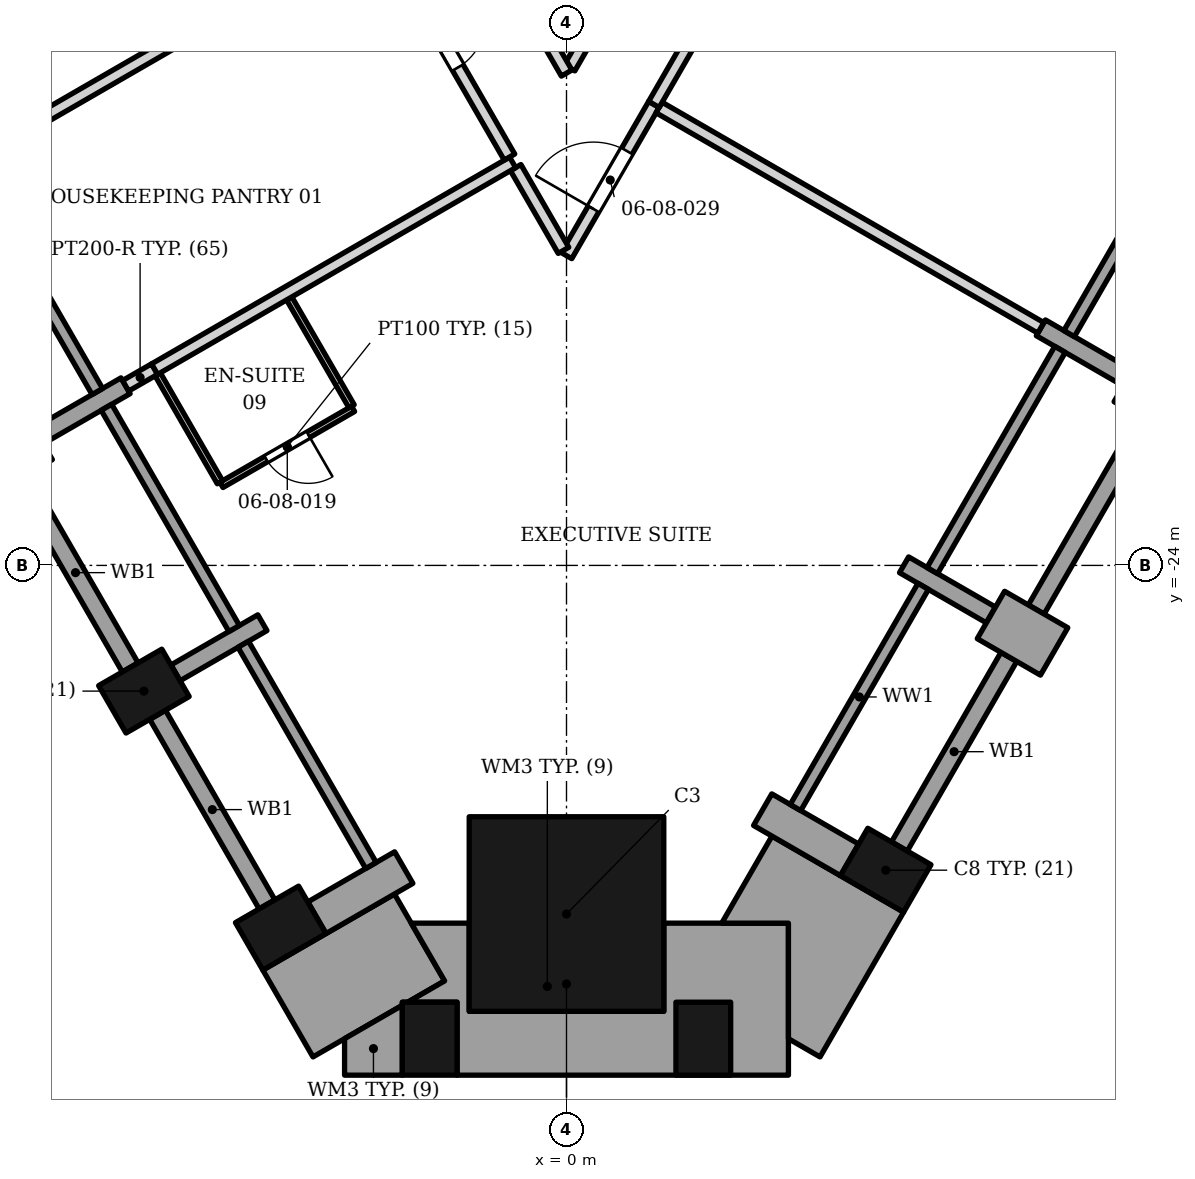
"""IFC4 building model, lengths in metres.
Left out: names, types, materials, properties, quantities, classifications, styles, units other than length and angle.
Written with IfcOpenShell. Run it as: python <this file> out.ifc"""

import sys

from ifc_helpers import new_model, si_unit, direction, frame, frame_2d, origin, origin_2d, place, context, subcontext, project, spatial, polyline, rectangle, outline, extrude, element, fill, save


model = new_model("IFC4")
c1 = context("Model", 3, precision=1e-05, world=origin(), true_north=direction((0.0, 1.0)))
c2 = subcontext(c1, "Body", "Model", "MODEL_VIEW")
j1 = project(units=[si_unit("LENGTHUNIT", "METRE"), si_unit("PLANEANGLEUNIT", "RADIAN")], contexts=[c1])
p1 = place(None, origin())
s1 = spatial("IfcSite", under=j1, at=p1, CompositionType="ELEMENT")
p2 = place(p1, origin())
s2 = spatial("IfcBuilding", under=s1, at=p2, CompositionType="ELEMENT")
p3 = place(p2, frame((0.0, 0.0, 46.0)))
s3 = spatial("IfcBuildingStorey", under=s2, at=p3, CompositionType="ELEMENT", Elevation=46.0)
p4 = place(p3, frame((0.0, -29.733, 0.0), z_axis=(0.0, 0.0, 1.0), x_axis=(0.0, 1.0, 0.0)))
e1 = element("IfcColumn", 1, at=p4, inside=s3, PredefinedType="COLUMN", context=c2, shape_type="SweptSolid", body=[
    extrude(rectangle(XDim=3.2, YDim=3.2, at=origin_2d()), origin(), (0.0, 0.0, 1.0), 3.4),
])
for number, where, z_axis, x_axis in (
    (2, (-6.95, -26.067, 0.0), (0.0, 0.0, 1.0), (0.5, -0.866, 0.0)),
    (3, (-4.7, -29.964, 0.0), (0.0, 0.0, 1.0), (0.5, -0.866, 0.0)),
    (4, (-2.25, -31.783, 0.0), (0.0, 0.0, 1.0), (1.0, 0.0, 0.0)),
    (5, (2.25, -31.783, 0.0), (0.0, 0.0, 1.0), (1.0, 0.0, 0.0)),
    (6, (5.25, -29.012, 0.0), (0.0, 0.0, 1.0), (0.5, 0.866, 0.0)),
    (7, (9.75, -21.218, 0.0), (0.0, 0.0, 1.0), (0.5, 0.866, 0.0)),
):
    element("IfcColumn", number, at=place(p3, frame(where, z_axis=z_axis, x_axis=x_axis)), inside=s3, PredefinedType="COLUMN", context=c2, shape_type="SweptSolid", body=[
        extrude(rectangle(XDim=0.9, YDim=1.2, at=origin_2d()), origin(), (0.0, 0.0, 1.0), 3.4),
    ])
p5 = place(p3, frame((-8.68, -21.87, 0.0), z_axis=(0.0, 0.0, 1.0), x_axis=(-0.866094119867, -0.499880961361, 0.0)))
e8 = element("IfcWall", 8, at=p5, inside=s3, PredefinedType="SOLIDWALL", context=c2, shape_type="SweptSolid", body=[
    extrude(rectangle(XDim=1.2, YDim=0.9, at=frame_2d((0.6, 0.0))), origin(), (0.0, 0.0, 1.0), 2.63),
])
p6 = place(p3, frame((-8.68, -21.87, 0.0), z_axis=(0.0, 0.0, 1.0), x_axis=(0.865976140824, 0.500085316245, 0.0)))
e9 = element("IfcWall", 9, at=p6, inside=s3, PredefinedType="SOLIDWALL", context=c2, shape_type="SweptSolid", body=[
    extrude(rectangle(XDim=1.65, YDim=0.3, at=frame_2d((0.825, 0.0))), origin(), (0.0, 0.0, 1.0), 2.65),
])
p7 = place(p3, frame((-6.43, -25.767, 0.0), z_axis=(0.0, 0.0, 1.0), x_axis=(0.866003217194, 0.500038426333, 0.0)))
e10 = element("IfcWall", 10, at=p7, inside=s3, PredefinedType="SOLIDWALL", context=c2, shape_type="SweptSolid", body=[
    extrude(rectangle(XDim=1.65, YDim=0.3, at=frame_2d((0.825, 0.0))), origin(), (0.0, 0.0, 1.0), 2.374),
])
p8 = place(p3, frame((-2.677, -28.969, 0.0), z_axis=(0.0, 0.0, 1.0), x_axis=(-0.866040211805, -0.499974350878, 0.0)))
e11 = element("IfcWall", 11, at=p8, inside=s3, PredefinedType="SOLIDWALL", context=c2, shape_type="SweptSolid", body=[
    extrude(rectangle(XDim=1.65, YDim=0.6, at=frame_2d((0.825, 0.0))), origin(), (0.0, 0.0, 1.0), 2.63),
])
p9 = place(p3, frame((-9.816, -17.503, 0.0), z_axis=(0.0, 0.0, 1.0), x_axis=(0.500002543286, -0.866023935413, 0.0)))
e12 = element("IfcWall", 12, at=p9, inside=s3, PredefinedType="ELEMENTEDWALL", context=c2, shape_type="SweptSolid", body=[
    extrude(rectangle(XDim=4.2, YDim=0.2, at=frame_2d((2.1, 0.0))), origin(), (0.0, 0.0, 1.0), 2.65),
])
p10 = place(p3, frame((-8.975, -22.56, 0.0), z_axis=(0.0, 0.0, 1.0), x_axis=(0.500012057535, -0.866018442252, 0.0)))
e13 = element("IfcWall", 13, at=p10, inside=s3, PredefinedType="SOLIDWALL", context=c2, shape_type="SweptSolid", body=[
    extrude(rectangle(XDim=3.6, YDim=0.3, at=frame_2d((1.8, 0.0))), origin(), (0.0, 0.0, 1.0), 2.63),
])
p11 = place(p3, frame((-7.566, -21.4, 0.0), z_axis=(0.0, 0.0, 1.0), x_axis=(0.500027713859, -0.866009402589, 0.0)))
e14 = element("IfcWall", 14, at=p11, inside=s3, PredefinedType="ELEMENTEDWALL", context=c2, shape_type="SweptSolid", body=[
    extrude(rectangle(XDim=4.2, YDim=0.2, at=frame_2d((2.1, 0.0))), origin(), (0.0, 0.0, 1.0), 2.65),
])
p12 = place(p3, frame((-4.925, -29.574, 0.0), z_axis=(0.0, 0.0, 1.0), x_axis=(-0.499990559667, 0.866030854095, 0.0)))
e15 = element("IfcWall", 15, at=p12, inside=s3, PredefinedType="SOLIDWALL", context=c2, shape_type="SweptSolid", body=[
    extrude(rectangle(XDim=3.6, YDim=0.3, at=frame_2d((1.8, 0.0))), origin(), (0.0, 0.0, 1.0), 2.63),
])
p13 = place(p3, frame((-5.316, -25.297, 0.0), z_axis=(0.0, 0.0, 1.0), x_axis=(0.500027713859, -0.866009402589, 0.0)))
e16 = element("IfcWall", 16, at=p13, inside=s3, PredefinedType="ELEMENTEDWALL", context=c2, shape_type="SweptSolid", body=[
    extrude(rectangle(XDim=4.2, YDim=0.2, at=frame_2d((2.1, 0.0))), origin(), (0.0, 0.0, 1.0), 2.374),
])
p14 = place(p3, frame((3.226, -28.017, 0.0), z_axis=(0.0, 0.0, 1.0), x_axis=(0.866040211805, -0.499974350878, 0.0)))
e17 = element("IfcWall", 17, at=p14, inside=s3, PredefinedType="SOLIDWALL", context=c2, shape_type="SweptSolid", body=[
    extrude(rectangle(XDim=1.65, YDim=0.6, at=frame_2d((0.825, 0.0))), origin(), (0.0, 0.0, 1.0), 2.65),
])
p15 = place(p3, frame((6.98, -24.815, 0.0), z_axis=(0.0, 0.0, 1.0), x_axis=(0.865955154139, -0.50012165622, 0.0)))
e18 = element("IfcWall", 18, at=p15, inside=s3, PredefinedType="SOLIDWALL", context=c2, shape_type="SweptSolid", body=[
    extrude(rectangle(XDim=1.2, YDim=0.9, at=frame_2d((0.6, 0.0))), origin(), (0.0, 0.0, 1.0), 2.63),
])
p16 = place(p3, frame((6.98, -24.815, 0.0), z_axis=(0.0, 0.0, 1.0), x_axis=(-0.866040211805, 0.499974350878, 0.0)))
e19 = element("IfcWall", 19, at=p16, inside=s3, PredefinedType="SOLIDWALL", context=c2, shape_type="SweptSolid", body=[
    extrude(rectangle(XDim=1.65, YDim=0.3, at=frame_2d((0.825, 0.0))), origin(), (0.0, 0.0, 1.0), 2.65),
])
p17 = place(p3, frame((7.802, -20.093, 0.0), z_axis=(0.0, 0.0, 1.0), x_axis=(0.865976140824, -0.500085316245, 0.0)))
e20 = element("IfcWall", 20, at=p17, inside=s3, PredefinedType="SOLIDWALL", context=c2, shape_type="SweptSolid", body=[
    extrude(rectangle(XDim=1.65, YDim=0.3, at=frame_2d((0.825, 0.0))), origin(), (0.0, 0.0, 1.0), 2.65),
])
p18 = place(p3, frame((5.475, -28.622, 0.0), z_axis=(0.0, 0.0, 1.0), x_axis=(0.499961193289, 0.866047807691, 0.0)))
e21 = element("IfcWall", 21, at=p18, inside=s3, PredefinedType="SOLIDWALL", context=c2, shape_type="SweptSolid", body=[
    extrude(rectangle(XDim=3.6, YDim=0.3, at=frame_2d((1.8, 0.0))), origin(), (0.0, 0.0, 1.0), 2.374),
])
p19 = place(p3, frame((3.766, -27.982, 0.0), z_axis=(0.0, 0.0, 1.0), x_axis=(0.500027713859, 0.866009402589, 0.0)))
e22 = element("IfcWall", 22, at=p19, inside=s3, PredefinedType="ELEMENTEDWALL", context=c2, shape_type="SweptSolid", body=[
    extrude(rectangle(XDim=4.2, YDim=0.2, at=frame_2d((2.1, 0.0))), origin(), (0.0, 0.0, 1.0), 2.374),
])
p20 = place(p3, frame((7.725, -24.725, 0.0), z_axis=(0.0, 0.0, 1.0), x_axis=(0.499961193289, 0.866047807691, 0.0)))
e23 = element("IfcWall", 23, at=p20, inside=s3, PredefinedType="SOLIDWALL", context=c2, shape_type="SweptSolid", body=[
    extrude(rectangle(XDim=3.6, YDim=0.3, at=frame_2d((1.8, 0.0))), origin(), (0.0, 0.0, 1.0), 2.63),
])
p21 = place(p3, frame((6.016, -24.085, 0.0), z_axis=(0.0, 0.0, 1.0), x_axis=(0.500027713859, 0.866009402589, 0.0)))
e24 = element("IfcWall", 24, at=p21, inside=s3, PredefinedType="ELEMENTEDWALL", context=c2, shape_type="SweptSolid", body=[
    extrude(rectangle(XDim=4.2, YDim=0.2, at=frame_2d((2.1, 0.0))), origin(), (0.0, 0.0, 1.0), 2.65),
])
p22 = place(p3, frame((8.266, -20.188, 0.0), z_axis=(0.0, 0.0, 1.0), x_axis=(0.500002543286, 0.866023935413, 0.0)))
e25 = element("IfcWall", 25, at=p22, inside=s3, PredefinedType="ELEMENTEDWALL", context=c2, shape_type="SweptSolid", body=[
    extrude(rectangle(XDim=4.2, YDim=0.2, at=frame_2d((2.1, 0.0))), origin(), (0.0, 0.0, 1.0), 2.65),
])
p23 = place(p3, origin())
e26 = element("IfcWall", 26, at=p23, inside=s3, PredefinedType="SOLIDWALL", context=c2, shape_type="SweptSolid", body=[
    extrude(outline(polyline([(-2.005, -30.833), (-2.83, -29.404), (-4.995, -30.654), (-4.17, -32.083), (-2.7, -31.235), (-2.7, -31.183), (-2.611, -31.183), (-2.005, -30.833)])), origin(), (0.0, 0.0, 1.0), 2.63),
])
p24 = place(p3, origin())
e27 = element("IfcWall", 27, at=p24, inside=s3, PredefinedType="SOLIDWALL", context=c2, shape_type="SweptSolid", body=[
    extrude(outline(polyline([(-3.65, -31.783), (-3.65, -32.383), (-2.7, -32.383), (-2.7, -31.235), (-3.65, -31.783)])), origin(), (0.0, 0.0, 1.0), 2.63),
])
p25 = place(p3, origin())
e28 = element("IfcWall", 28, at=p25, inside=s3, PredefinedType="SOLIDWALL", context=c2, shape_type="SweptSolid", body=[
    extrude(outline(polyline([(-1.8, -31.183), (-1.8, -32.383), (3.65, -32.383), (3.65, -29.883), (1.6, -29.883), (1.6, -31.333), (-1.6, -31.333), (-1.6, -29.883), (-2.553, -29.883), (-2.005, -30.833), (-2.611, -31.183), (-1.8, -31.183)])), origin(), (0.0, 0.0, 1.0), 2.63),
])
p26 = place(p3, origin())
e29 = element("IfcWall", 29, at=p26, inside=s3, PredefinedType="SOLIDWALL", context=c2, shape_type="SweptSolid", body=[
    extrude(outline(polyline([(4.505, -29.102), (3.38, -28.452), (2.553, -29.883), (3.65, -29.883), (3.65, -31.783), (4.17, -32.083), (5.544, -29.702), (4.505, -29.102), (4.505, -29.102)])), origin(), (0.0, 0.0, 1.0), 2.63),
])
p27 = place(p3, frame((-5.675, -22.676, 0.0), z_axis=(0.0, 0.0, 1.0), x_axis=(0.866022959057, 0.500004234368, 0.0)))
e30 = element("IfcWall", 30, at=p27, inside=s3, PredefinedType="PARTITIONING", context=c2, shape_type="SweptSolid", body=[
    extrude(rectangle(XDim=2.5, YDim=0.1, at=frame_2d((1.25, 0.0))), origin(), (0.0, 0.0, 1.0), 2.552),
])
p28 = place(p27, frame((0.85, 0.0, 0.0)))
e31 = element("IfcOpeningElement", 31, at=p28, cuts=e30, PredefinedType="OPENING", context=c2, shape_type="SweptSolid", body=[
    extrude(rectangle(XDim=0.8, YDim=2.1, at=frame_2d((0.4, 1.05))), frame((0.0, 0.06, 0.0), z_axis=(0.0, -1.0, 0.0), x_axis=(1.0, 0.0, 0.0)), (0.0, 0.0, 1.0), 0.12),
])
p29 = place(p3, frame((-4.561, -19.608, 0.0), z_axis=(0.0, 0.0, 1.0), x_axis=(0.500646589026, -0.865651773461, 0.0)))
e32 = element("IfcWall", 32, at=p29, inside=s3, PredefinedType="PARTITIONING", context=c2, shape_type="SweptSolid", body=[
    extrude(rectangle(XDim=2.05, YDim=0.1, at=frame_2d((1.025, 0.0))), origin(), (0.0, 0.0, 1.0), 2.552),
])
p30 = place(p3, frame((-7.251, -21.046, 0.0), z_axis=(0.0, 0.0, 1.0), x_axis=(0.86747675874, 0.497477711105, 0.0)))
e33 = element("IfcWall", 33, at=p30, inside=s3, PredefinedType="PARTITIONING", context=c2, shape_type="SweptSolid", body=[
    extrude(rectangle(XDim=0.55, YDim=0.2, at=frame_2d((0.275, 0.0))), origin(), (0.0, 0.0, 1.0), 3.23),
])
p31 = place(p3, frame((-6.723, -20.856, 0.0), z_axis=(0.0, 0.0, 1.0), x_axis=(0.499354689006, -0.866397653833, 0.0)))
e34 = element("IfcWall", 34, at=p31, inside=s3, PredefinedType="PARTITIONING", context=c2, shape_type="SweptSolid", body=[
    extrude(rectangle(XDim=2.05, YDim=0.1, at=frame_2d((1.025, 0.0))), origin(), (0.0, 0.0, 1.0), 3.23),
])
p32 = place(p3, frame((0.0, -18.906, 0.0), z_axis=(0.0, 0.0, 1.0), x_axis=(0.50046312627, 0.865757852545, 0.0)))
e35 = element("IfcWall", 35, at=p32, inside=s3, PredefinedType="PARTITIONING", context=c2, shape_type="SweptSolid", body=[
    extrude(rectangle(XDim=2.872, YDim=0.2, at=frame_2d((1.436, 0.0))), origin(), (0.0, 0.0, 1.0), 2.628),
])
p33 = place(p32, frame((0.886, 0.0, 0.0)))
e36 = element("IfcOpeningElement", 36, at=p33, cuts=e35, PredefinedType="OPENING", context=c2, shape_type="SweptSolid", body=[
    extrude(rectangle(XDim=1.1, YDim=2.1, at=frame_2d((0.55, 1.05))), frame((0.0, 0.11, 0.0), z_axis=(0.0, -1.0, 0.0), x_axis=(1.0, 0.0, 0.0)), (0.0, 0.0, 1.0), 0.22),
])
p34 = place(p3, frame((-0.836, -17.458, 0.0), z_axis=(0.0, 0.0, 1.0), x_axis=(0.50013013712, -0.865950256045, 0.0)))
e37 = element("IfcWall", 37, at=p34, inside=s3, PredefinedType="PARTITIONING", context=c2, shape_type="SweptSolid", body=[
    extrude(rectangle(XDim=1.572, YDim=0.2, at=frame_2d((0.786, 0.0))), origin(), (0.0, 0.0, 1.0), 2.628),
])
p35 = place(p3, frame((-6.774, -20.772, 0.0), z_axis=(0.0, 0.0, 1.0), x_axis=(0.866036107898, 0.499981459473, 0.0)))
e38 = element("IfcWall", 38, at=p35, inside=s3, PredefinedType="PARTITIONING", context=c2, shape_type="SweptSolid", body=[
    extrude(rectangle(XDim=6.8, YDim=0.2, at=frame_2d((3.4, 0.0))), origin(), (0.0, 0.0, 1.0), 2.552),
])
p36 = place(p3, frame((-3.137, -13.476, 0.0), z_axis=(0.0, 0.0, 1.0), x_axis=(0.499989943423, -0.866031209874, 0.0)))
e39 = element("IfcWall", 39, at=p36, inside=s3, PredefinedType="PARTITIONING", context=c2, shape_type="SweptSolid", body=[
    extrude(rectangle(XDim=4.398, YDim=0.2, at=frame_2d((2.199, 0.0))), origin(), (0.0, 0.0, 1.0), 3.23),
])
p37 = place(p36, frame((1.798, 0.0, 0.0)))
e40 = element("IfcOpeningElement", 40, at=p37, cuts=e39, PredefinedType="OPENING", context=c2, shape_type="SweptSolid", body=[
    extrude(rectangle(XDim=0.9, YDim=2.1, at=frame_2d((0.45, 1.05))), frame((0.0, 0.11, 0.0), z_axis=(0.0, -1.0, 0.0), x_axis=(1.0, 0.0, 0.0)), (0.0, 0.0, 1.0), 0.22),
])
p38 = place(p3, frame((1.522, -16.469, 0.0), z_axis=(0.0, 0.0, 1.0), x_axis=(0.866125590059, -0.499826432119, 0.0)))
e41 = element("IfcWall", 41, at=p38, inside=s3, PredefinedType="PARTITIONING", context=c2, shape_type="SweptSolid", body=[
    extrude(rectangle(XDim=7.25, YDim=0.2, at=frame_2d((3.625, 0.0))), origin(), (0.0, 0.0, 1.0), 2.552),
])
p39 = place(p3, frame((0.05, -15.818, 0.0), z_axis=(0.0, 0.0, 1.0), x_axis=(0.499521489101, 0.866301495974, 0.0)))
e42 = element("IfcWall", 42, at=p39, inside=s3, PredefinedType="PARTITIONING", context=c2, shape_type="SweptSolid", body=[
    extrude(rectangle(XDim=3.401, YDim=0.2, at=frame_2d((1.7, 0.0))), origin(), (0.0, 0.0, 1.0), 2.628),
])
p40 = place(p39, frame((1.2, 0.0, 0.0)))
e43 = element("IfcOpeningElement", 43, at=p40, cuts=e42, PredefinedType="OPENING", context=c2, shape_type="SweptSolid", body=[
    extrude(rectangle(XDim=0.9, YDim=2.1, at=frame_2d((0.45, 1.05))), frame((0.0, 0.11, 0.0), z_axis=(0.0, -1.0, 0.0), x_axis=(1.0, 0.0, 0.0)), (0.0, 0.0, 1.0), 0.22),
])
p41 = place(p3, frame((-9.501, -17.148, 0.0), z_axis=(0.0, 0.0, 1.0), x_axis=(0.866032838626, 0.499987122256, 0.0)))
e44 = element("IfcWall", 44, at=p41, inside=s3, PredefinedType="PARTITIONING", context=c2, shape_type="SweptSolid", body=[
    extrude(rectangle(XDim=4.551, YDim=0.2, at=frame_2d((2.276, 0.0))), origin(), (0.0, 0.0, 1.0), 2.782),
])
p42 = place(p3, frame((-6.783, -4.156, 0.0), z_axis=(0.0, 0.0, 1.0), x_axis=(0.500162761554, -0.865931412962, 0.0)))
e45 = element("IfcWall", 45, at=p42, inside=s3, PredefinedType="PARTITIONING", context=c2, shape_type="SweptSolid", body=[
    extrude(rectangle(XDim=13.566, YDim=0.2, at=frame_2d((6.783, 0.0))), origin(), (0.0, 0.0, 1.0), 2.302),
])
p43 = place(p42, frame((4.642, 0.0, 0.0)))
e46 = element("IfcOpeningElement", 46, at=p43, cuts=e45, PredefinedType="OPENING", context=c2, shape_type="SweptSolid", body=[
    extrude(rectangle(XDim=0.9, YDim=2.1, at=frame_2d((0.45, 1.05))), frame((0.0, 0.11, 0.0), z_axis=(0.0, -1.0, 0.0), x_axis=(1.0, 0.0, 0.0)), (0.0, 0.0, 1.0), 0.22),
])
p44 = place(p3, frame((1.438, -16.419, 0.0), z_axis=(0.0, 0.0, 1.0), x_axis=(0.499996012009, 0.86602770624, 0.0)))
e47 = element("IfcWall", 47, at=p44, inside=s3, PredefinedType="PARTITIONING", context=c2, shape_type="SweptSolid", body=[
    extrude(rectangle(XDim=18.0, YDim=0.2, at=frame_2d((9.0, 0.0))), origin(), (0.0, 0.0, 1.0), 2.302),
])
p45 = place(p44, frame((4.0, 0.0, 0.0)))
e48 = element("IfcOpeningElement", 48, at=p45, cuts=e47, PredefinedType="OPENING", context=c2, shape_type="SweptSolid", body=[
    extrude(rectangle(XDim=1.0, YDim=2.1, at=frame_2d((0.5, 1.05))), frame((0.0, 0.11, 0.0), z_axis=(0.0, -1.0, 0.0), x_axis=(1.0, 0.0, 0.0)), (0.0, 0.0, 1.0), 0.22),
])
p46 = place(p44, frame((9.8, 0.0, 0.0)))
e49 = element("IfcOpeningElement", 49, at=p46, cuts=e47, PredefinedType="OPENING", context=c2, shape_type="SweptSolid", body=[
    extrude(rectangle(XDim=1.1, YDim=2.1, at=frame_2d((0.55, 1.05))), frame((0.0, 0.11, 0.0), z_axis=(0.0, -1.0, 0.0), x_axis=(1.0, 0.0, 0.0)), (0.0, 0.0, 1.0), 0.22),
])
p47 = place(p37, origin())
e50 = element("IfcDoor", 50, at=p47, inside=s3, OperationType="SINGLE_SWING_LEFT", PredefinedType="DOOR", context=c2, shape_type="SweptSolid", body=[
    extrude(rectangle(XDim=0.9, YDim=2.1, at=frame_2d((0.45, 1.05))), frame((0.0, 0.025, 0.0), z_axis=(0.0, -1.0, 0.0), x_axis=(1.0, 0.0, 0.0)), (0.0, 0.0, 1.0), 0.05),
])
fill(e40, e50)
p48 = place(p28, origin())
e51 = element("IfcDoor", 51, at=p48, inside=s3, OperationType="SINGLE_SWING_RIGHT", PredefinedType="DOOR", context=c2, shape_type="SweptSolid", body=[
    extrude(rectangle(XDim=0.8, YDim=2.1, at=frame_2d((0.4, 1.05))), frame((0.0, 0.025, 0.0), z_axis=(0.0, -1.0, 0.0), x_axis=(1.0, 0.0, 0.0)), (0.0, 0.0, 1.0), 0.05),
])
fill(e31, e51)
p49 = place(p33, origin())
e52 = element("IfcDoor", 52, at=p49, inside=s3, OperationType="SINGLE_SWING_LEFT", PredefinedType="DOOR", context=c2, shape_type="SweptSolid", body=[
    extrude(rectangle(XDim=1.1, YDim=2.1, at=frame_2d((0.55, 1.05))), frame((0.0, 0.025, 0.0), z_axis=(0.0, -1.0, 0.0), x_axis=(1.0, 0.0, 0.0)), (0.0, 0.0, 1.0), 0.05),
])
fill(e36, e52)
save(model, sys.argv[1])
